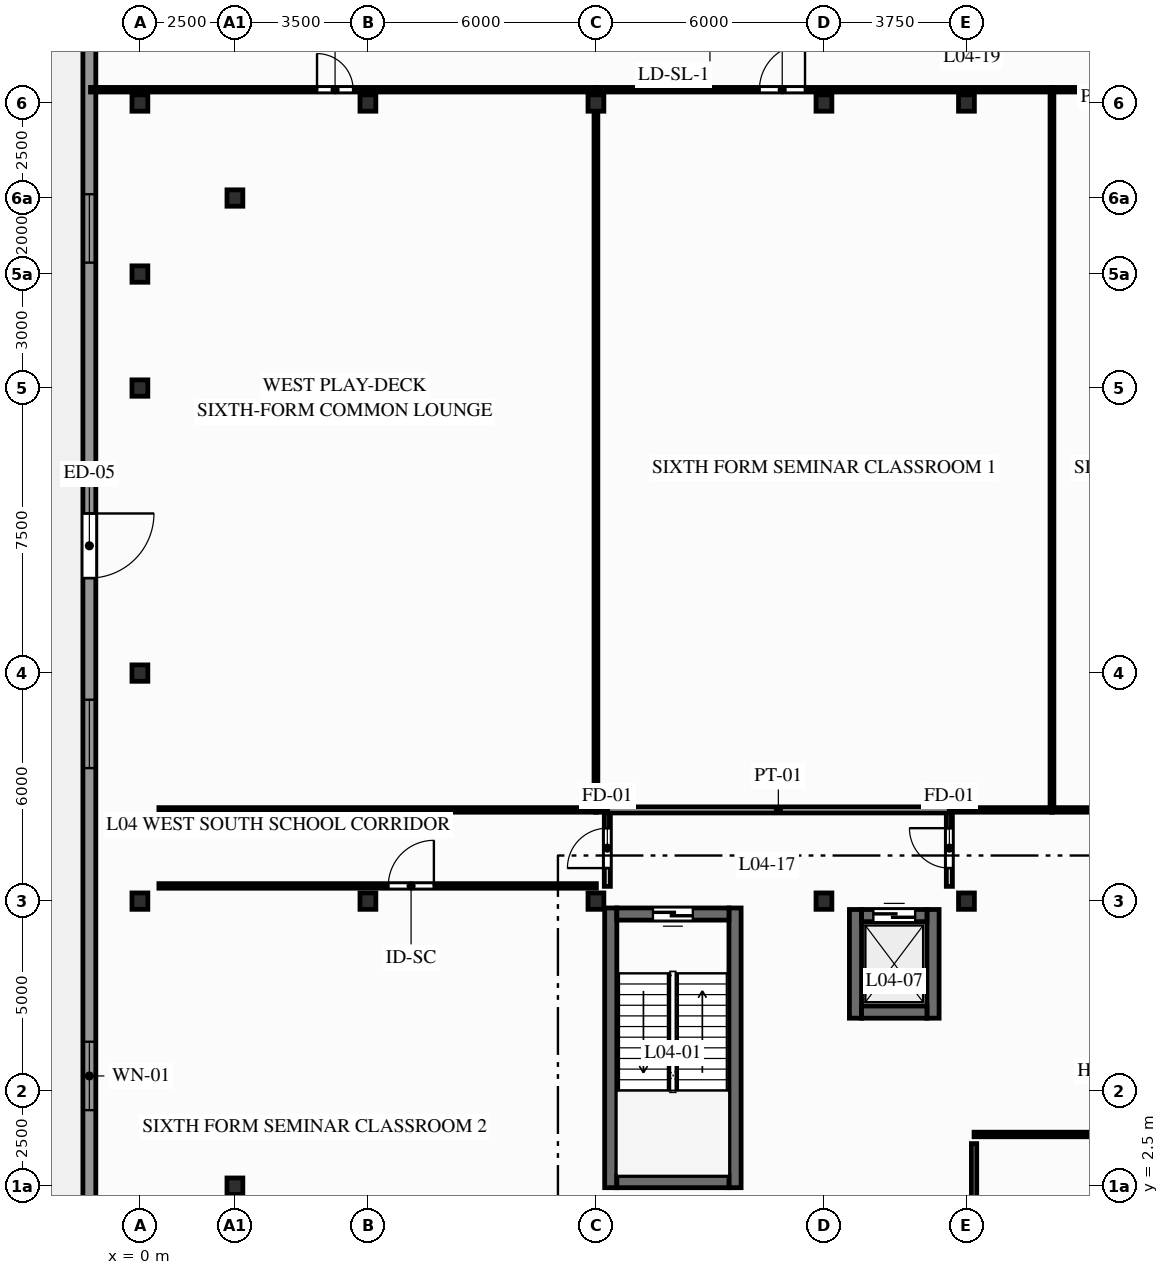
"""IFC4 building model, lengths in metres.
Left out: names, types, materials, properties, quantities, classifications, styles, units other than length and angle.
Written with IfcOpenShell. Run it as: python <this file> out.ifc"""

import sys

from ifc_helpers import new_model, si_unit, direction, frame, frame_2d, origin, origin_2d, place, context, subcontext, project, spatial, rectangle, i_section, extrude, element, fill, save


model = new_model("IFC4")
c1 = context("Model", 3, precision=1e-05, world=origin(), true_north=direction((0.0, 1.0)))
c2 = subcontext(c1, "Body", "Model", "MODEL_VIEW")
j1 = project(units=[si_unit("LENGTHUNIT", "METRE"), si_unit("PLANEANGLEUNIT", "RADIAN")], contexts=[c1])
p1 = place(None, origin())
s1 = spatial("IfcSite", under=j1, at=p1, CompositionType="ELEMENT")
p2 = place(p1, origin())
s2 = spatial("IfcBuilding", under=s1, at=p2, CompositionType="ELEMENT")
p3 = place(p2, frame((0.0, 0.0, 18.0)))
s3 = spatial("IfcBuildingStorey", under=s2, at=p3, CompositionType="ELEMENT", Elevation=18.0)
for number, where, z_axis, x_axis in (
    (1, (0.0, 10.0, 0.0), (0.0, 0.0, 1.0), (1.0, 0.0, 0.0)),
    (2, (0.0, 16.0, 0.0), (0.0, 0.0, 1.0), (1.0, 0.0, 0.0)),
    (3, (0.0, 23.5, 0.0), (0.0, 0.0, 1.0), (1.0, 0.0, 0.0)),
    (4, (0.0, 26.5, 0.0), (0.0, 0.0, 1.0), (1.0, 0.0, 0.0)),
    (5, (0.0, 31.0, 0.0), (0.0, 0.0, 1.0), (1.0, 0.0, 0.0)),
    (6, (2.5, 2.5, 0.0), (0.0, 0.0, 1.0), (1.0, 0.0, 0.0)),
    (7, (2.5, 28.5, 0.0), (0.0, 0.0, 1.0), (1.0, 0.0, 0.0)),
    (8, (6.0, 10.0, 0.0), (0.0, 0.0, 1.0), (1.0, 0.0, 0.0)),
    (9, (6.0, 31.0, 0.0), (0.0, 0.0, 1.0), (1.0, 0.0, 0.0)),
    (10, (12.0, 10.0, 0.0), (0.0, 0.0, 1.0), (1.0, 0.0, 0.0)),
    (11, (12.0, 31.0, 0.0), (0.0, 0.0, 1.0), (1.0, 0.0, 0.0)),
    (12, (18.0, 10.0, 0.0), (0.0, 0.0, 1.0), (1.0, 0.0, 0.0)),
    (13, (18.0, 31.0, 0.0), (0.0, 0.0, 1.0), (1.0, 0.0, 0.0)),
    (14, (21.75, 10.0, 0.0), (0.0, 0.0, 1.0), (1.0, 0.0, 0.0)),
    (15, (21.75, 31.0, 0.0), (0.0, 0.0, 1.0), (1.0, 0.0, 0.0)),
):
    element("IfcColumn", number, at=place(p3, frame(where, z_axis=z_axis, x_axis=x_axis)), inside=s3, PredefinedType="COLUMN", context=c2, shape_type="SweptSolid", body=[
        extrude(i_section(OverallWidth=0.417, OverallDepth=0.431, WebThickness=0.065, FlangeThickness=0.106, FilletRadius=0.015, at=origin_2d()), origin(), (0.0, 0.0, 1.0), 4.5),
    ])
p4 = place(p3, frame((-1.33, 34.6, 0.0), z_axis=(0.0, 0.0, 1.0), x_axis=(0.0, -1.0, 0.0)))
e16 = element("IfcWall", 16, at=p4, inside=s3, PredefinedType="STANDARD", context=c2, shape_type="SweptSolid", body=[
    extrude(rectangle(XDim=36.43, YDim=0.34, at=frame_2d((18.215, 0.0))), origin(), (0.0, 0.0, 1.0), 4.22),
])
p5 = place(p4, frame((28.3, 0.0, 0.9)))
e17 = element("IfcOpeningElement", 17, at=p5, cuts=e16, PredefinedType="OPENING", context=c2, shape_type="SweptSolid", body=[
    extrude(rectangle(XDim=1.8, YDim=1.95, at=frame_2d((0.9, 0.975))), frame((0.0, 0.18, 0.0), z_axis=(0.0, -1.0, 0.0), x_axis=(1.0, 0.0, 0.0)), (0.0, 0.0, 1.0), 0.36),
])
p6 = place(p4, frame((19.3, 0.0, 0.9)))
e18 = element("IfcOpeningElement", 18, at=p6, cuts=e16, PredefinedType="OPENING", context=c2, shape_type="SweptSolid", body=[
    extrude(rectangle(XDim=1.8, YDim=1.95, at=frame_2d((0.9, 0.975))), frame((0.0, 0.18, 0.0), z_axis=(0.0, -1.0, 0.0), x_axis=(1.0, 0.0, 0.0)), (0.0, 0.0, 1.0), 0.36),
])
p7 = place(p4, frame((6.0, 0.0, 0.9)))
e19 = element("IfcOpeningElement", 19, at=p7, cuts=e16, PredefinedType="OPENING", context=c2, shape_type="SweptSolid", body=[
    extrude(rectangle(XDim=1.8, YDim=1.95, at=frame_2d((0.9, 0.975))), frame((0.0, 0.18, 0.0), z_axis=(0.0, -1.0, 0.0), x_axis=(1.0, 0.0, 0.0)), (0.0, 0.0, 1.0), 0.36),
])
p8 = place(p4, frame((14.4, 0.0, 0.0)))
e20 = element("IfcOpeningElement", 20, at=p8, cuts=e16, PredefinedType="OPENING", context=c2, shape_type="SweptSolid", body=[
    extrude(rectangle(XDim=1.7, YDim=2.3, at=frame_2d((0.85, 1.15))), frame((0.0, 0.18, 0.0), z_axis=(0.0, -1.0, 0.0), x_axis=(1.0, 0.0, 0.0)), (0.0, 0.0, 1.0), 0.36),
])
for number, where, z_axis, x_axis in (
    (21, (12.39, 2.46, 0.0), (0.0, 0.0, 1.0), (0.0, 1.0, 0.0)),
    (22, (15.66, 2.46, 0.0), (0.0, 0.0, 1.0), (0.0, 1.0, 0.0)),
):
    element("IfcWall", number, at=place(p3, frame(where, z_axis=z_axis, x_axis=x_axis)), inside=s3, PredefinedType="SHEAR", context=c2, shape_type="SweptSolid", body=[
        extrude(rectangle(XDim=7.36, YDim=0.32, at=frame_2d((3.68, 0.0))), origin(), (0.0, 0.0, 1.0), 4.22),
    ])
p9 = place(p3, frame((12.55, 2.62, 0.0), z_axis=(0.0, 0.0, 1.0), x_axis=(1.0, 0.0, 0.0)))
e23 = element("IfcWall", 23, at=p9, inside=s3, PredefinedType="SHEAR", context=c2, shape_type="SweptSolid", body=[
    extrude(rectangle(XDim=2.95, YDim=0.32, at=frame_2d((1.475, 0.0))), origin(), (0.0, 0.0, 1.0), 4.22),
])
p10 = place(p3, frame((15.5, 9.66, 0.0), z_axis=(0.0, 0.0, 1.0), x_axis=(-1.0, 0.0, 0.0)))
e24 = element("IfcWall", 24, at=p10, inside=s3, PredefinedType="SHEAR", context=c2, shape_type="SweptSolid", body=[
    extrude(rectangle(XDim=2.95, YDim=0.32, at=frame_2d((1.475, 0.0))), origin(), (0.0, 0.0, 1.0), 4.22),
])
p11 = place(p10, frame((0.95, 0.0, 0.0)))
e25 = element("IfcOpeningElement", 25, at=p11, cuts=e24, PredefinedType="OPENING", context=c2, shape_type="SweptSolid", body=[
    extrude(rectangle(XDim=1.05, YDim=2.06, at=frame_2d((0.525, 1.03))), frame((0.0, 0.17, 0.0), z_axis=(0.0, -1.0, 0.0), x_axis=(1.0, 0.0, 0.0)), (0.0, 0.0, 1.0), 0.34),
])
for number, where, z_axis, x_axis in (
    (26, (18.83, 6.92, 0.0), (0.0, 0.0, 1.0), (0.0, 1.0, 0.0)),
    (27, (20.87, 6.92, 0.0), (0.0, 0.0, 1.0), (0.0, 1.0, 0.0)),
):
    element("IfcWall", number, at=place(p3, frame(where, z_axis=z_axis, x_axis=x_axis)), inside=s3, PredefinedType="SHEAR", context=c2, shape_type="SweptSolid", body=[
        extrude(rectangle(XDim=2.86, YDim=0.32, at=frame_2d((1.43, 0.0))), origin(), (0.0, 0.0, 1.0), 4.22),
    ])
p12 = place(p3, frame((18.99, 7.08, 0.0), z_axis=(0.0, 0.0, 1.0), x_axis=(1.0, 0.0, 0.0)))
e28 = element("IfcWall", 28, at=p12, inside=s3, PredefinedType="SHEAR", context=c2, shape_type="SweptSolid", body=[
    extrude(rectangle(XDim=1.72, YDim=0.32, at=frame_2d((0.86, 0.0))), origin(), (0.0, 0.0, 1.0), 4.22),
])
p13 = place(p3, frame((18.99, 9.62, 0.0), z_axis=(0.0, 0.0, 1.0), x_axis=(1.0, 0.0, 0.0)))
e29 = element("IfcWall", 29, at=p13, inside=s3, PredefinedType="SHEAR", context=c2, shape_type="SweptSolid", body=[
    extrude(rectangle(XDim=1.72, YDim=0.32, at=frame_2d((0.86, 0.0))), origin(), (0.0, 0.0, 1.0), 4.22),
])
p14 = place(p13, frame((0.31, 0.0, 0.0)))
e30 = element("IfcOpeningElement", 30, at=p14, cuts=e29, PredefinedType="OPENING", context=c2, shape_type="SweptSolid", body=[
    extrude(rectangle(XDim=1.1, YDim=2.06, at=frame_2d((0.55, 1.03))), frame((0.0, 0.17, 0.0), z_axis=(0.0, -1.0, 0.0), x_axis=(1.0, 0.0, 0.0)), (0.0, 0.0, 1.0), 0.34),
])
p15 = place(p3, frame((21.95, 3.86, 0.0), z_axis=(0.0, 0.0, 1.0), x_axis=(1.0, 0.0, 0.0)))
e31 = element("IfcWall", 31, at=p15, inside=s3, PredefinedType="PARTITIONING", context=c2, shape_type="SweptSolid", body=[
    extrude(rectangle(XDim=13.046, YDim=0.12, at=frame_2d((6.523, 0.0))), origin(), (0.0, 0.0, 1.0), 4.22),
])
p16 = place(p3, frame((12.3, 10.389, 0.0), z_axis=(0.0, 0.0, 1.0), x_axis=(0.0, 1.0, 0.0)))
e32 = element("IfcWall", 32, at=p16, inside=s3, PredefinedType="PARTITIONING", context=c2, shape_type="SweptSolid", body=[
    extrude(rectangle(XDim=2.011, YDim=0.16, at=frame_2d((1.006, 0.0))), origin(), (0.0, 0.0, 1.0), 4.22),
])
p17 = place(p16, frame((0.481, 0.0, 0.0)))
e33 = element("IfcOpeningElement", 33, at=p17, cuts=e32, PredefinedType="OPENING", context=c2, shape_type="SweptSolid", body=[
    extrude(rectangle(XDim=1.05, YDim=2.06, at=frame_2d((0.525, 1.03))), frame((0.0, 0.09, 0.0), z_axis=(0.0, -1.0, 0.0), x_axis=(1.0, 0.0, 0.0)), (0.0, 0.0, 1.0), 0.18),
])
p18 = place(p3, frame((21.3, 10.389, 0.0), z_axis=(0.0, 0.0, 1.0), x_axis=(0.0, 1.0, 0.0)))
e34 = element("IfcWall", 34, at=p18, inside=s3, PredefinedType="PARTITIONING", context=c2, shape_type="SweptSolid", body=[
    extrude(rectangle(XDim=2.011, YDim=0.16, at=frame_2d((1.006, 0.0))), origin(), (0.0, 0.0, 1.0), 4.22),
])
p19 = place(p18, frame((0.481, 0.0, 0.0)))
e35 = element("IfcOpeningElement", 35, at=p19, cuts=e34, PredefinedType="OPENING", context=c2, shape_type="SweptSolid", body=[
    extrude(rectangle(XDim=1.05, YDim=2.06, at=frame_2d((0.525, 1.03))), frame((0.0, 0.09, 0.0), z_axis=(0.0, -1.0, 0.0), x_axis=(1.0, 0.0, 0.0)), (0.0, 0.0, 1.0), 0.18),
])
p20 = place(p3, frame((12.3, 12.4, 0.0), z_axis=(0.0, 0.0, 1.0), x_axis=(1.0, 0.0, 0.0)))
e36 = element("IfcWall", 36, at=p20, inside=s3, PredefinedType="PARTITIONING", context=c2, shape_type="SweptSolid", body=[
    extrude(rectangle(XDim=9.0, YDim=0.16, at=frame_2d((4.5, 0.0))), origin(), (0.0, 0.0, 1.0), 3.344),
])
p21 = place(p3, frame((-1.3, 31.35, 0.0), z_axis=(0.0, 0.0, 1.0), x_axis=(1.0, 0.0, 0.0)))
e37 = element("IfcWall", 37, at=p21, inside=s3, PredefinedType="PARTITIONING", context=c2, shape_type="SweptSolid", body=[
    extrude(rectangle(XDim=13.311, YDim=0.12, at=frame_2d((6.656, 0.0))), origin(), (0.0, 0.0, 1.0), 3.344),
])
p22 = place(p21, frame((5.961, 0.0, 0.0)))
e38 = element("IfcOpeningElement", 38, at=p22, cuts=e37, PredefinedType="OPENING", context=c2, shape_type="SweptSolid", body=[
    extrude(rectangle(XDim=0.95, YDim=2.05, at=frame_2d((0.475, 1.025))), frame((0.0, 0.07, 0.0), z_axis=(0.0, -1.0, 0.0), x_axis=(1.0, 0.0, 0.0)), (0.0, 0.0, 1.0), 0.14),
])
p23 = place(p3, frame((11.993, 31.35, 0.0), z_axis=(0.0, 0.0, 1.0), x_axis=(1.0, 0.0, 0.0)))
e39 = element("IfcWall", 39, at=p23, inside=s3, PredefinedType="PARTITIONING", context=c2, shape_type="SweptSolid", body=[
    extrude(rectangle(XDim=12.019, YDim=0.12, at=frame_2d((6.009, 0.0))), origin(), (0.0, 0.0, 1.0), 3.344),
])
p24 = place(p23, frame((4.309, 0.0, 0.0)))
e40 = element("IfcOpeningElement", 40, at=p24, cuts=e39, PredefinedType="OPENING", context=c2, shape_type="SweptSolid", body=[
    extrude(rectangle(XDim=1.2, YDim=2.08, at=frame_2d((0.6, 1.04))), frame((0.0, 0.07, 0.0), z_axis=(0.0, -1.0, 0.0), x_axis=(1.0, 0.0, 0.0)), (0.0, 0.0, 1.0), 0.14),
])
p25 = place(p3, frame((23.993, 31.35, 0.0), z_axis=(0.0, 0.0, 1.0), x_axis=(1.0, 0.0, 0.0)))
e41 = element("IfcWall", 41, at=p25, inside=s3, PredefinedType="PARTITIONING", context=c2, shape_type="SweptSolid", body=[
    extrude(rectangle(XDim=10.215, YDim=0.12, at=frame_2d((5.107, 0.0))), origin(), (0.0, 0.0, 1.0), 4.22),
])
p26 = place(p25, frame((4.632, 0.0, 0.0)))
e42 = element("IfcOpeningElement", 42, at=p26, cuts=e41, PredefinedType="OPENING", context=c2, shape_type="SweptSolid", body=[
    extrude(rectangle(XDim=0.95, YDim=2.05, at=frame_2d((0.475, 1.025))), frame((0.0, 0.07, 0.0), z_axis=(0.0, -1.0, 0.0), x_axis=(1.0, 0.0, 0.0)), (0.0, 0.0, 1.0), 0.14),
])
p27 = place(p3, frame((0.5, 12.4, 0.0), z_axis=(0.0, 0.0, 1.0), x_axis=(1.0, 0.0, 0.0)))
e43 = element("IfcWall", 43, at=p27, inside=s3, PredefinedType="PARTITIONING", context=c2, shape_type="SweptSolid", body=[
    extrude(rectangle(XDim=11.511, YDim=0.12, at=frame_2d((5.756, 0.0))), origin(), (0.0, 0.0, 1.0), 3.344),
])
p28 = place(p3, frame((11.993, 12.4, 0.0), z_axis=(0.0, 0.0, 1.0), x_axis=(1.0, 0.0, 0.0)))
e44 = element("IfcWall", 44, at=p28, inside=s3, PredefinedType="PARTITIONING", context=c2, shape_type="SweptSolid", body=[
    extrude(rectangle(XDim=0.303, YDim=0.12, at=frame_2d((0.152, 0.0))), origin(), (0.0, 0.0, 1.0), 3.344),
])
p29 = place(p3, frame((0.5, 10.4, 0.0), z_axis=(0.0, 0.0, 1.0), x_axis=(1.0, 0.0, 0.0)))
e45 = element("IfcWall", 45, at=p29, inside=s3, PredefinedType="PARTITIONING", context=c2, shape_type="SweptSolid", body=[
    extrude(rectangle(XDim=11.511, YDim=0.12, at=frame_2d((5.756, 0.0))), origin(), (0.0, 0.0, 1.0), 3.344),
])
p30 = place(p29, frame((6.036, 0.0, 0.0)))
e46 = element("IfcOpeningElement", 46, at=p30, cuts=e45, PredefinedType="OPENING", context=c2, shape_type="SweptSolid", body=[
    extrude(rectangle(XDim=1.2, YDim=2.08, at=frame_2d((0.6, 1.04))), frame((0.0, 0.07, 0.0), z_axis=(0.0, -1.0, 0.0), x_axis=(1.0, 0.0, 0.0)), (0.0, 0.0, 1.0), 0.14),
])
p31 = place(p3, frame((21.304, 12.4, 0.0), z_axis=(0.0, 0.0, 1.0), x_axis=(1.0, 0.0, 0.0)))
e47 = element("IfcWall", 47, at=p31, inside=s3, PredefinedType="PARTITIONING", context=c2, shape_type="SweptSolid", body=[
    extrude(rectangle(XDim=2.707, YDim=0.12, at=frame_2d((1.354, 0.0))), origin(), (0.0, 0.0, 1.0), 3.344),
])
p32 = place(p3, frame((23.993, 12.4, 0.0), z_axis=(0.0, 0.0, 1.0), x_axis=(1.0, 0.0, 0.0)))
e48 = element("IfcWall", 48, at=p32, inside=s3, PredefinedType="PARTITIONING", context=c2, shape_type="SweptSolid", body=[
    extrude(rectangle(XDim=10.215, YDim=0.12, at=frame_2d((5.107, 0.0))), origin(), (0.0, 0.0, 1.0), 3.344),
])
p33 = place(p3, frame((12.0, 12.404, 0.0), z_axis=(0.0, 0.0, 1.0), x_axis=(0.0, 1.0, 0.0)))
e49 = element("IfcWall", 49, at=p33, inside=s3, PredefinedType="PARTITIONING", context=c2, shape_type="SweptSolid", body=[
    extrude(rectangle(XDim=18.942, YDim=0.1, at=frame_2d((9.471, 0.0))), origin(), (0.0, 0.0, 1.0), 3.344),
])
p34 = place(p3, frame((24.0, 12.404, 0.0), z_axis=(0.0, 0.0, 1.0), x_axis=(0.0, 1.0, 0.0)))
e50 = element("IfcWall", 50, at=p34, inside=s3, PredefinedType="PARTITIONING", context=c2, shape_type="SweptSolid", body=[
    extrude(rectangle(XDim=18.942, YDim=0.1, at=frame_2d((9.471, 0.0))), origin(), (0.0, 0.0, 1.0), 3.583),
])
p35 = place(p3, frame((21.95, 0.18, 0.0), z_axis=(0.0, 0.0, 1.0), x_axis=(0.0, 1.0, 0.0)))
e51 = element("IfcWall", 51, at=p35, inside=s3, PredefinedType="PARTITIONING", context=c2, shape_type="SweptSolid", body=[
    extrude(rectangle(XDim=3.44, YDim=0.14, at=frame_2d((1.72, 0.0))), origin(), (0.0, 0.0, 1.0), 3.344),
])
p36 = place(p5, origin())
e52 = element("IfcWindow", 52, at=p36, inside=s3, PartitioningType="SINGLE_PANEL", PredefinedType="WINDOW", context=c2, shape_type="SweptSolid", body=[
    extrude(rectangle(XDim=1.8, YDim=1.95, at=frame_2d((0.9, 0.975))), frame((0.0, 0.03, 0.0), z_axis=(0.0, -1.0, 0.0), x_axis=(1.0, 0.0, 0.0)), (0.0, 0.0, 1.0), 0.06),
])
fill(e17, e52)
p37 = place(p6, origin())
e53 = element("IfcWindow", 53, at=p37, inside=s3, PartitioningType="SINGLE_PANEL", PredefinedType="WINDOW", context=c2, shape_type="SweptSolid", body=[
    extrude(rectangle(XDim=1.8, YDim=1.95, at=frame_2d((0.9, 0.975))), frame((0.0, 0.03, 0.0), z_axis=(0.0, -1.0, 0.0), x_axis=(1.0, 0.0, 0.0)), (0.0, 0.0, 1.0), 0.06),
])
fill(e18, e53)
p38 = place(p7, origin())
e54 = element("IfcWindow", 54, at=p38, inside=s3, PartitioningType="SINGLE_PANEL", PredefinedType="WINDOW", context=c2, shape_type="SweptSolid", body=[
    extrude(rectangle(XDim=1.8, YDim=1.95, at=frame_2d((0.9, 0.975))), frame((0.0, 0.03, 0.0), z_axis=(0.0, -1.0, 0.0), x_axis=(1.0, 0.0, 0.0)), (0.0, 0.0, 1.0), 0.06),
])
fill(e19, e54)
p39 = place(p8, origin())
e55 = element("IfcDoor", 55, at=p39, inside=s3, OperationType="SINGLE_SWING_LEFT", PredefinedType="DOOR", context=c2, shape_type="SweptSolid", body=[
    extrude(rectangle(XDim=1.7, YDim=2.3, at=frame_2d((0.85, 1.15))), frame((0.0, 0.025, 0.0), z_axis=(0.0, -1.0, 0.0), x_axis=(1.0, 0.0, 0.0)), (0.0, 0.0, 1.0), 0.05),
])
fill(e20, e55)
p40 = place(p11, origin())
e56 = element("IfcDoor", 56, at=p40, inside=s3, OperationType="SINGLE_SWING_RIGHT", PredefinedType="DOOR", context=c2, shape_type="SweptSolid", body=[
    extrude(rectangle(XDim=1.05, YDim=2.06, at=frame_2d((0.525, 1.03))), frame((0.0, 0.025, 0.0), z_axis=(0.0, -1.0, 0.0), x_axis=(1.0, 0.0, 0.0)), (0.0, 0.0, 1.0), 0.05),
])
fill(e25, e56)
p41 = place(p14, origin())
e57 = element("IfcDoor", 57, at=p41, inside=s3, OperationType="SLIDING_TO_RIGHT", PredefinedType="DOOR", context=c2, shape_type="SweptSolid", body=[
    extrude(rectangle(XDim=1.1, YDim=2.06, at=frame_2d((0.55, 1.03))), frame((0.0, 0.025, 0.0), z_axis=(0.0, -1.0, 0.0), x_axis=(1.0, 0.0, 0.0)), (0.0, 0.0, 1.0), 0.05),
])
fill(e30, e57)
p42 = place(p17, origin())
e58 = element("IfcDoor", 58, at=p42, inside=s3, OperationType="SINGLE_SWING_LEFT", PredefinedType="DOOR", context=c2, shape_type="SweptSolid", body=[
    extrude(rectangle(XDim=1.05, YDim=2.06, at=frame_2d((0.525, 1.03))), frame((0.0, 0.025, 0.0), z_axis=(0.0, -1.0, 0.0), x_axis=(1.0, 0.0, 0.0)), (0.0, 0.0, 1.0), 0.05),
])
fill(e33, e58)
p43 = place(p19, origin())
e59 = element("IfcDoor", 59, at=p43, inside=s3, OperationType="SINGLE_SWING_RIGHT", PredefinedType="DOOR", context=c2, shape_type="SweptSolid", body=[
    extrude(rectangle(XDim=1.05, YDim=2.06, at=frame_2d((0.525, 1.03))), frame((0.0, 0.025, 0.0), z_axis=(0.0, -1.0, 0.0), x_axis=(1.0, 0.0, 0.0)), (0.0, 0.0, 1.0), 0.05),
])
fill(e35, e59)
p44 = place(p22, origin())
e60 = element("IfcDoor", 60, at=p44, inside=s3, OperationType="SINGLE_SWING_LEFT", PredefinedType="DOOR", context=c2, shape_type="SweptSolid", body=[
    extrude(rectangle(XDim=0.95, YDim=2.05, at=frame_2d((0.475, 1.025))), frame((0.0, 0.025, 0.0), z_axis=(0.0, -1.0, 0.0), x_axis=(1.0, 0.0, 0.0)), (0.0, 0.0, 1.0), 0.05),
])
fill(e38, e60)
p45 = place(p24, origin())
e61 = element("IfcDoor", 61, at=p45, inside=s3, OperationType="SINGLE_SWING_RIGHT", PredefinedType="DOOR", context=c2, shape_type="SweptSolid", body=[
    extrude(rectangle(XDim=1.2, YDim=2.08, at=frame_2d((0.6, 1.04))), frame((0.0, 0.025, 0.0), z_axis=(0.0, -1.0, 0.0), x_axis=(1.0, 0.0, 0.0)), (0.0, 0.0, 1.0), 0.05),
])
fill(e40, e61)
p46 = place(p30, origin())
e62 = element("IfcDoor", 62, at=p46, inside=s3, OperationType="SINGLE_SWING_RIGHT", PredefinedType="DOOR", context=c2, shape_type="SweptSolid", body=[
    extrude(rectangle(XDim=1.2, YDim=2.08, at=frame_2d((0.6, 1.04))), frame((0.0, 0.025, 0.0), z_axis=(0.0, -1.0, 0.0), x_axis=(1.0, 0.0, 0.0)), (0.0, 0.0, 1.0), 0.05),
])
fill(e46, e62)
save(model, sys.argv[1])
